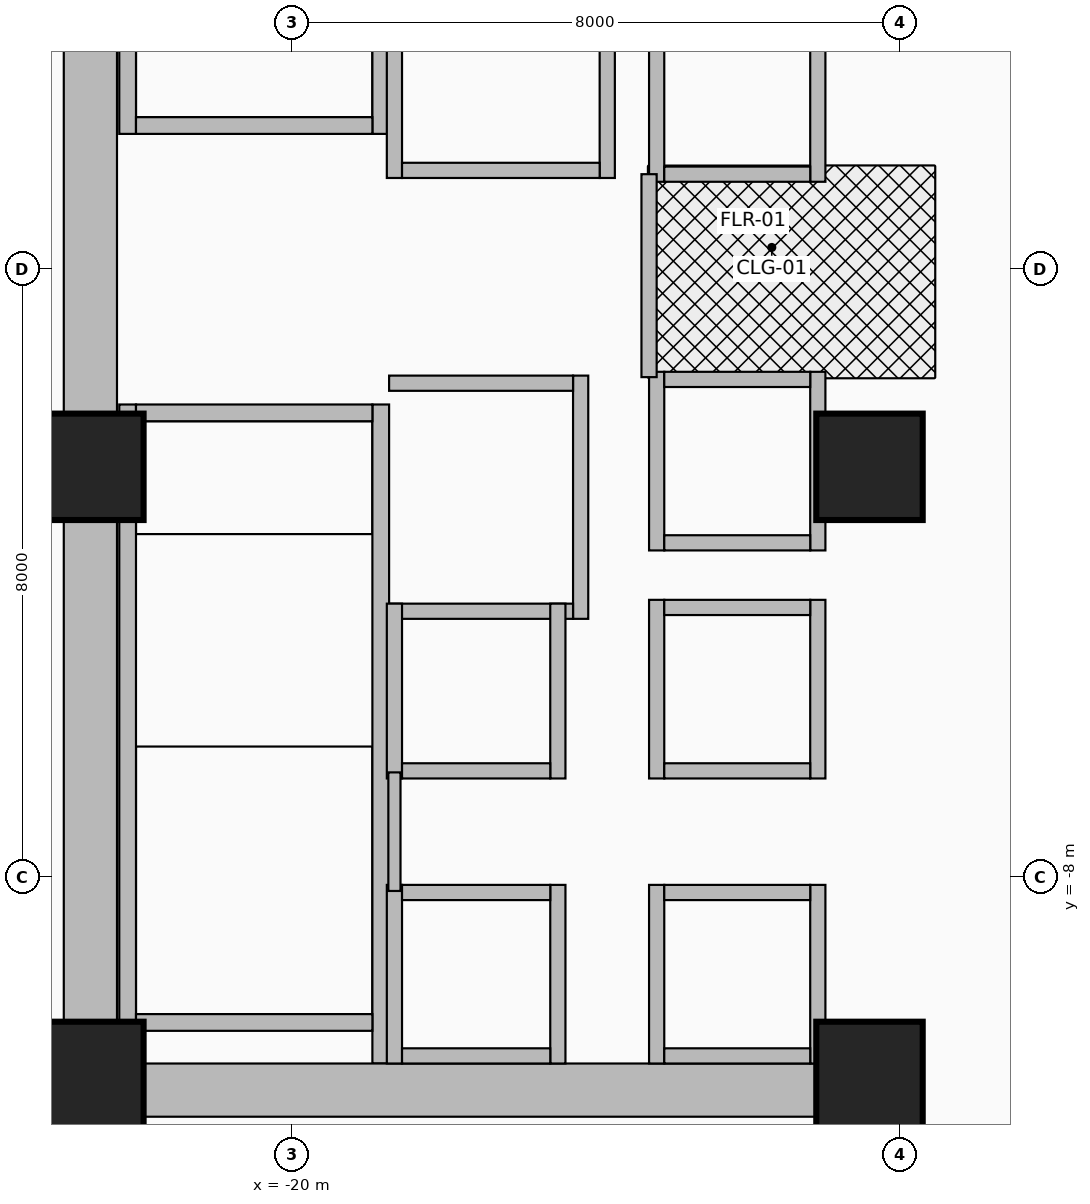
"""IFC4 building model, lengths in metres.
Left out: names, types, materials, properties, quantities, classifications, styles, units other than length and angle.
Written with IfcOpenShell. Run it as: python <this file> out.ifc"""

import sys

from ifc_helpers import new_model, si_unit, direction, frame, frame_2d, origin, origin_2d, place, context, subcontext, project, spatial, rectangle, extrude, source, transform, mapped, element, fill, save


model = new_model("IFC4")
c1 = context("Model", 3, precision=1e-05, world=origin(), true_north=direction((0.0, 1.0)))
c2 = subcontext(c1, "Body", "Model", "MODEL_VIEW")
j1 = project(units=[si_unit("LENGTHUNIT", "METRE"), si_unit("PLANEANGLEUNIT", "RADIAN")], contexts=[c1])
p1 = place(None, origin())
s1 = spatial("IfcSite", under=j1, at=p1, CompositionType="ELEMENT")
p2 = place(p1, origin())
s2 = spatial("IfcBuilding", under=s1, at=p2, CompositionType="ELEMENT")
p3 = place(p2, frame((0.0, 0.0, 48.2)))
s3 = spatial("IfcBuildingStorey", under=s2, at=p3, CompositionType="ELEMENT", Elevation=48.2)
for number, where, z_axis, x_axis in (
    (1, (-22.16, 1.78, 0.0), (0.0, 0.0, 1.0), (0.0, 1.0, 0.0)),
    (2, (-18.83, 1.78, 0.0), (0.0, 0.0, 1.0), (0.0, 1.0, 0.0)),
):
    element("IfcWall", number, at=place(p3, frame(where, z_axis=z_axis, x_axis=x_axis)), inside=s3, PredefinedType="SHEAR", context=c2, shape_type="SweptSolid", body=[
        extrude(rectangle(XDim=8.67, YDim=0.22, at=frame_2d((4.335, 0.0))), origin(), (0.0, 0.0, 1.0), 3.46),
    ])
p4 = place(p3, frame((-22.05, 1.89, 0.0), z_axis=(0.0, 0.0, 1.0), x_axis=(1.0, 0.0, 0.0)))
e3 = element("IfcWall", 3, at=p4, inside=s3, PredefinedType="SHEAR", context=c2, shape_type="SweptSolid", body=[
    extrude(rectangle(XDim=3.11, YDim=0.22, at=frame_2d((1.555, 0.0))), origin(), (0.0, 0.0, 1.0), 3.46),
])
p5 = place(p4, frame((1.0, 0.0, 0.0)))
e4 = element("IfcOpeningElement", 4, at=p5, cuts=e3, PredefinedType="OPENING", context=c2, shape_type="SweptSolid", body=[
    extrude(rectangle(XDim=1.1, YDim=2.15, at=frame_2d((0.55, 1.075))), frame((0.0, 0.125, 0.0), z_axis=(0.0, -1.0, 0.0), x_axis=(1.0, 0.0, 0.0)), (0.0, 0.0, 1.0), 0.25),
])
for number, where, z_axis, x_axis in (
    (5, (-22.16, -10.45, 0.0), (0.0, 0.0, 1.0), (0.0, 1.0, 0.0)),
    (6, (-18.83, -10.45, 0.0), (0.0, 0.0, 1.0), (0.0, 1.0, 0.0)),
):
    element("IfcWall", number, at=place(p3, frame(where, z_axis=z_axis, x_axis=x_axis)), inside=s3, PredefinedType="SHEAR", context=c2, shape_type="SweptSolid", body=[
        extrude(rectangle(XDim=8.67, YDim=0.22, at=frame_2d((4.335, 0.0))), origin(), (0.0, 0.0, 1.0), 3.46),
    ])
p6 = place(p3, frame((-22.05, -9.91, 0.0), z_axis=(0.0, 0.0, 1.0), x_axis=(1.0, 0.0, 0.0)))
e7 = element("IfcWall", 7, at=p6, inside=s3, PredefinedType="SHEAR", context=c2, shape_type="SweptSolid", body=[
    extrude(rectangle(XDim=3.11, YDim=0.22, at=frame_2d((1.555, 0.0))), origin(), (0.0, 0.0, 1.0), 3.46),
])
p7 = place(p3, frame((-22.05, -1.89, 0.0), z_axis=(0.0, 0.0, 1.0), x_axis=(1.0, 0.0, 0.0)))
e8 = element("IfcWall", 8, at=p7, inside=s3, PredefinedType="SHEAR", context=c2, shape_type="SweptSolid", body=[
    extrude(rectangle(XDim=3.11, YDim=0.22, at=frame_2d((1.555, 0.0))), origin(), (0.0, 0.0, 1.0), 3.46),
])
p8 = place(p7, frame((1.0, 0.0, 0.0)))
e9 = element("IfcOpeningElement", 9, at=p8, cuts=e8, PredefinedType="OPENING", context=c2, shape_type="SweptSolid", body=[
    extrude(rectangle(XDim=1.1, YDim=2.15, at=frame_2d((0.55, 1.075))), frame((0.0, 0.125, 0.0), z_axis=(0.0, -1.0, 0.0), x_axis=(1.0, 0.0, 0.0)), (0.0, 0.0, 1.0), 0.25),
])
p9 = place(p3, frame((-22.65, -11.15, 0.0), z_axis=(0.0, 0.0, 1.0), x_axis=(0.0, 1.0, 0.0)))
e10 = element("IfcWall", 10, at=p9, inside=s3, PredefinedType="SHEAR", context=c2, shape_type="SweptSolid", body=[
    extrude(rectangle(XDim=22.3, YDim=0.7, at=frame_2d((11.15, 0.0))), origin(), (0.0, 0.0, 1.0), 3.46),
])
p10 = place(p3, frame((-22.65, -10.8, 0.0), z_axis=(0.0, 0.0, 1.0), x_axis=(1.0, 0.0, 0.0)))
e11 = element("IfcWall", 11, at=p10, inside=s3, PredefinedType="SHEAR", context=c2, shape_type="SweptSolid", body=[
    extrude(rectangle(XDim=10.25, YDim=0.7, at=frame_2d((5.125, 0.0))), origin(), (0.0, 0.0, 1.0), 3.46),
])
m1 = source(origin(), c2, "Body", "SweptSolid", [
    extrude(rectangle(XDim=1.4, YDim=1.4, at=origin_2d()), origin(), (0.0, 0.0, 1.0), 3.7),
])
for number, where, z_axis, x_axis in (
    (12, (-22.65, -10.6, 0.0), (0.0, 0.0, 1.0), (1.0, 0.0, 0.0)),
    (13, (-12.4, -10.6, 0.0), (0.0, 0.0, 1.0), (1.0, 0.0, 0.0)),
    (14, (-22.65, -2.6, 0.0), (0.0, 0.0, 1.0), (1.0, 0.0, 0.0)),
    (15, (-12.4, -2.6, 0.0), (0.0, 0.0, 1.0), (1.0, 0.0, 0.0)),
):
    element("IfcColumn", number, at=place(p3, frame(where, z_axis=z_axis, x_axis=x_axis)), inside=s3, PredefinedType="COLUMN", context=c2, shape_type="MappedRepresentation", body=[
        mapped(m1, transform((0.0, 0.0, 0.0), x_axis=(1.0, 0.0, 0.0), y_axis=(0.0, 1.0, 0.0), z_axis=(0.0, 0.0, 1.0), scale=1.0)),
    ])
for number, where, z_axis, x_axis in (
    (16, (-18.65, 1.2, 0.0), (0.0, 0.0, 1.0), (0.0, 1.0, 0.0)),
    (17, (-15.85, 1.2, 0.0), (0.0, 0.0, 1.0), (0.0, 1.0, 0.0)),
):
    element("IfcWall", number, at=place(p3, frame(where, z_axis=z_axis, x_axis=x_axis)), inside=s3, PredefinedType="MOVABLE", context=c2, shape_type="SweptSolid", body=[
        extrude(rectangle(XDim=3.225, YDim=0.2, at=frame_2d((1.613, 0.0))), origin(), (0.0, 0.0, 1.0), 3.46),
    ])
p11 = place(p3, frame((-18.55, 1.3, 0.0), z_axis=(0.0, 0.0, 1.0), x_axis=(1.0, 0.0, 0.0)))
e18 = element("IfcWall", 18, at=p11, inside=s3, PredefinedType="MOVABLE", context=c2, shape_type="SweptSolid", body=[
    extrude(rectangle(XDim=2.6, YDim=0.2, at=frame_2d((1.3, 0.0))), origin(), (0.0, 0.0, 1.0), 3.46),
])
p12 = place(p11, frame((0.7, 0.0, 0.0)))
e19 = element("IfcOpeningElement", 19, at=p12, cuts=e18, PredefinedType="OPENING", context=c2, shape_type="SweptSolid", body=[
    extrude(rectangle(XDim=1.2, YDim=2.1, at=frame_2d((0.6, 1.05))), frame((0.0, 0.115, 0.0), z_axis=(0.0, -1.0, 0.0), x_axis=(1.0, 0.0, 0.0)), (0.0, 0.0, 1.0), 0.23),
])
p13 = place(p3, frame((-16.2, -4.6, 0.0), z_axis=(0.0, 0.0, 1.0), x_axis=(0.0, 1.0, 0.0)))
e20 = element("IfcWall", 20, at=p13, inside=s3, PredefinedType="MOVABLE", context=c2, shape_type="SweptSolid", body=[
    extrude(rectangle(XDim=3.2, YDim=0.2, at=frame_2d((1.6, 0.0))), origin(), (0.0, 0.0, 1.0), 3.46),
])
p14 = place(p3, frame((-18.72, -4.5, 0.0), z_axis=(0.0, 0.0, 1.0), x_axis=(1.0, 0.0, 0.0)))
e21 = element("IfcWall", 21, at=p14, inside=s3, PredefinedType="MOVABLE", context=c2, shape_type="SweptSolid", body=[
    extrude(rectangle(XDim=2.42, YDim=0.2, at=frame_2d((1.21, 0.0))), origin(), (0.0, 0.0, 1.0), 3.46),
])
p15 = place(p3, frame((-18.72, -1.5, 0.0), z_axis=(0.0, 0.0, 1.0), x_axis=(1.0, 0.0, 0.0)))
e22 = element("IfcWall", 22, at=p15, inside=s3, PredefinedType="MOVABLE", context=c2, shape_type="SweptSolid", body=[
    extrude(rectangle(XDim=2.42, YDim=0.2, at=frame_2d((1.21, 0.0))), origin(), (0.0, 0.0, 1.0), 3.46),
])
p16 = place(p15, frame((0.61, 0.0, 0.0)))
e23 = element("IfcOpeningElement", 23, at=p16, cuts=e22, PredefinedType="OPENING", context=c2, shape_type="SweptSolid", body=[
    extrude(rectangle(XDim=1.2, YDim=2.1, at=frame_2d((0.6, 1.05))), frame((0.0, 0.115, 0.0), z_axis=(0.0, -1.0, 0.0), x_axis=(1.0, 0.0, 0.0)), (0.0, 0.0, 1.0), 0.23),
])
for number, where, z_axis, x_axis in (
    (24, (-15.2, -10.45, 0.0), (0.0, 0.0, 1.0), (0.0, 1.0, 0.0)),
    (25, (-13.08, -10.45, 0.0), (0.0, 0.0, 1.0), (0.0, 1.0, 0.0)),
):
    element("IfcWall", number, at=place(p3, frame(where, z_axis=z_axis, x_axis=x_axis)), inside=s3, PredefinedType="MOVABLE", context=c2, shape_type="SweptSolid", body=[
        extrude(rectangle(XDim=2.35, YDim=0.2, at=frame_2d((1.175, 0.0))), origin(), (0.0, 0.0, 1.0), 2.583),
    ])
p17 = place(p3, frame((-15.1, -10.35, 0.0), z_axis=(0.0, 0.0, 1.0), x_axis=(1.0, 0.0, 0.0)))
e26 = element("IfcWall", 26, at=p17, inside=s3, PredefinedType="MOVABLE", context=c2, shape_type="SweptSolid", body=[
    extrude(rectangle(XDim=1.92, YDim=0.2, at=frame_2d((0.96, 0.0))), origin(), (0.0, 0.0, 1.0), 2.583),
])
p18 = place(p3, frame((-15.1, -8.2, 0.0), z_axis=(0.0, 0.0, 1.0), x_axis=(1.0, 0.0, 0.0)))
e27 = element("IfcWall", 27, at=p18, inside=s3, PredefinedType="MOVABLE", context=c2, shape_type="SweptSolid", body=[
    extrude(rectangle(XDim=1.92, YDim=0.2, at=frame_2d((0.96, 0.0))), origin(), (0.0, 0.0, 1.0), 3.46),
])
p19 = place(p18, frame((0.41, 0.0, 0.0)))
e28 = element("IfcOpeningElement", 28, at=p19, cuts=e27, PredefinedType="OPENING", context=c2, shape_type="SweptSolid", body=[
    extrude(rectangle(XDim=1.1, YDim=2.1, at=frame_2d((0.55, 1.05))), frame((0.0, 0.115, 0.0), z_axis=(0.0, -1.0, 0.0), x_axis=(1.0, 0.0, 0.0)), (0.0, 0.0, 1.0), 0.23),
])
for number, where, z_axis, x_axis in (
    (29, (-15.2, -6.7, 0.0), (0.0, 0.0, 1.0), (0.0, 1.0, 0.0)),
    (30, (-13.08, -6.7, 0.0), (0.0, 0.0, 1.0), (0.0, 1.0, 0.0)),
):
    element("IfcWall", number, at=place(p3, frame(where, z_axis=z_axis, x_axis=x_axis)), inside=s3, PredefinedType="MOVABLE", context=c2, shape_type="SweptSolid", body=[
        extrude(rectangle(XDim=2.35, YDim=0.2, at=frame_2d((1.175, 0.0))), origin(), (0.0, 0.0, 1.0), 3.46),
    ])
p20 = place(p3, frame((-15.1, -6.6, 0.0), z_axis=(0.0, 0.0, 1.0), x_axis=(1.0, 0.0, 0.0)))
e31 = element("IfcWall", 31, at=p20, inside=s3, PredefinedType="MOVABLE", context=c2, shape_type="SweptSolid", body=[
    extrude(rectangle(XDim=1.92, YDim=0.2, at=frame_2d((0.96, 0.0))), origin(), (0.0, 0.0, 1.0), 3.46),
])
p21 = place(p20, frame((0.41, 0.0, 0.0)))
e32 = element("IfcOpeningElement", 32, at=p21, cuts=e31, PredefinedType="OPENING", context=c2, shape_type="SweptSolid", body=[
    extrude(rectangle(XDim=1.1, YDim=2.1, at=frame_2d((0.55, 1.05))), frame((0.0, 0.115, 0.0), z_axis=(0.0, -1.0, 0.0), x_axis=(1.0, 0.0, 0.0)), (0.0, 0.0, 1.0), 0.23),
])
p22 = place(p3, frame((-15.1, -4.45, 0.0), z_axis=(0.0, 0.0, 1.0), x_axis=(1.0, 0.0, 0.0)))
e33 = element("IfcWall", 33, at=p22, inside=s3, PredefinedType="MOVABLE", context=c2, shape_type="SweptSolid", body=[
    extrude(rectangle(XDim=1.92, YDim=0.2, at=frame_2d((0.96, 0.0))), origin(), (0.0, 0.0, 1.0), 3.46),
])
for number, where, z_axis, x_axis in (
    (34, (-18.65, -10.45, 0.0), (0.0, 0.0, 1.0), (0.0, 1.0, 0.0)),
    (35, (-16.5, -10.45, 0.0), (0.0, 0.0, 1.0), (0.0, 1.0, 0.0)),
):
    element("IfcWall", number, at=place(p3, frame(where, z_axis=z_axis, x_axis=x_axis)), inside=s3, PredefinedType="MOVABLE", context=c2, shape_type="SweptSolid", body=[
        extrude(rectangle(XDim=2.35, YDim=0.2, at=frame_2d((1.175, 0.0))), origin(), (0.0, 0.0, 1.0), 2.583),
    ])
p23 = place(p3, frame((-18.55, -10.35, 0.0), z_axis=(0.0, 0.0, 1.0), x_axis=(1.0, 0.0, 0.0)))
e36 = element("IfcWall", 36, at=p23, inside=s3, PredefinedType="MOVABLE", context=c2, shape_type="SweptSolid", body=[
    extrude(rectangle(XDim=1.95, YDim=0.2, at=frame_2d((0.975, 0.0))), origin(), (0.0, 0.0, 1.0), 2.583),
])
p24 = place(p3, frame((-18.55, -8.2, 0.0), z_axis=(0.0, 0.0, 1.0), x_axis=(1.0, 0.0, 0.0)))
e37 = element("IfcWall", 37, at=p24, inside=s3, PredefinedType="MOVABLE", context=c2, shape_type="SweptSolid", body=[
    extrude(rectangle(XDim=1.95, YDim=0.2, at=frame_2d((0.975, 0.0))), origin(), (0.0, 0.0, 1.0), 3.46),
])
for number, where, z_axis, x_axis in (
    (38, (-15.2, 1.15, 0.0), (0.0, 0.0, 1.0), (0.0, 1.0, 0.0)),
    (39, (-13.08, 1.15, 0.0), (0.0, 0.0, 1.0), (0.0, 1.0, 0.0)),
):
    element("IfcWall", number, at=place(p3, frame(where, z_axis=z_axis, x_axis=x_axis)), inside=s3, PredefinedType="MOVABLE", context=c2, shape_type="SweptSolid", body=[
        extrude(rectangle(XDim=2.25, YDim=0.2, at=frame_2d((1.125, 0.0))), origin(), (0.0, 0.0, 1.0), 3.46),
    ])
p25 = place(p3, frame((-15.1, 1.25, 0.0), z_axis=(0.0, 0.0, 1.0), x_axis=(1.0, 0.0, 0.0)))
e40 = element("IfcWall", 40, at=p25, inside=s3, PredefinedType="MOVABLE", context=c2, shape_type="SweptSolid", body=[
    extrude(rectangle(XDim=1.92, YDim=0.2, at=frame_2d((0.96, 0.0))), origin(), (0.0, 0.0, 1.0), 3.46),
])
for number, where, z_axis, x_axis in (
    (41, (-18.65, -6.7, 0.0), (0.0, 0.0, 1.0), (0.0, 1.0, 0.0)),
    (42, (-16.5, -6.7, 0.0), (0.0, 0.0, 1.0), (0.0, 1.0, 0.0)),
):
    element("IfcWall", number, at=place(p3, frame(where, z_axis=z_axis, x_axis=x_axis)), inside=s3, PredefinedType="MOVABLE", context=c2, shape_type="SweptSolid", body=[
        extrude(rectangle(XDim=2.3, YDim=0.2, at=frame_2d((1.15, 0.0))), origin(), (0.0, 0.0, 1.0), 3.46),
    ])
p26 = place(p3, frame((-18.55, -6.6, 0.0), z_axis=(0.0, 0.0, 1.0), x_axis=(1.0, 0.0, 0.0)))
e43 = element("IfcWall", 43, at=p26, inside=s3, PredefinedType="MOVABLE", context=c2, shape_type="SweptSolid", body=[
    extrude(rectangle(XDim=1.95, YDim=0.2, at=frame_2d((0.975, 0.0))), origin(), (0.0, 0.0, 1.0), 3.46),
])
for number, where, z_axis, x_axis in (
    (44, (-15.2, -3.7, 0.0), (0.0, 0.0, 1.0), (0.0, 1.0, 0.0)),
    (45, (-13.08, -3.7, 0.0), (0.0, 0.0, 1.0), (0.0, 1.0, 0.0)),
):
    element("IfcWall", number, at=place(p3, frame(where, z_axis=z_axis, x_axis=x_axis)), inside=s3, PredefinedType="MOVABLE", context=c2, shape_type="SweptSolid", body=[
        extrude(rectangle(XDim=2.35, YDim=0.2, at=frame_2d((1.175, 0.0))), origin(), (0.0, 0.0, 1.0), 3.46),
    ])
for number, where, z_axis, x_axis in (
    (46, (-15.1, -3.6, 0.0), (0.0, 0.0, 1.0), (1.0, 0.0, 0.0)),
    (47, (-15.1, -1.45, 0.0), (0.0, 0.0, 1.0), (1.0, 0.0, 0.0)),
):
    element("IfcWall", number, at=place(p3, frame(where, z_axis=z_axis, x_axis=x_axis)), inside=s3, PredefinedType="MOVABLE", context=c2, shape_type="SweptSolid", body=[
        extrude(rectangle(XDim=1.92, YDim=0.2, at=frame_2d((0.96, 0.0))), origin(), (0.0, 0.0, 1.0), 3.46),
    ])
p27 = place(p3, frame((-15.3, -1.42, 0.0), z_axis=(0.0, 0.0, 1.0), x_axis=(0.0, 1.0, 0.0)))
e48 = element("IfcWall", 48, at=p27, inside=s3, PredefinedType="PARTITIONING", context=c2, shape_type="SweptSolid", body=[
    extrude(rectangle(XDim=2.67, YDim=0.2, at=frame_2d((1.335, 0.0))), origin(), (0.0, 0.0, 1.0), 3.46),
])
p28 = place(p27, frame((0.78, 0.0, 0.0)))
e49 = element("IfcOpeningElement", 49, at=p28, cuts=e48, PredefinedType="OPENING", context=c2, shape_type="SweptSolid", body=[
    extrude(rectangle(XDim=1.05, YDim=2.15, at=frame_2d((0.525, 1.075))), frame((0.0, 0.115, 0.0), z_axis=(0.0, -1.0, 0.0), x_axis=(1.0, 0.0, 0.0)), (0.0, 0.0, 1.0), 0.23),
])
p29 = place(p3, frame((-18.65, -8.18, 0.0), z_axis=(0.0, 0.0, 1.0), x_axis=(0.0, 1.0, 0.0)))
e50 = element("IfcWall", 50, at=p29, inside=s3, PredefinedType="PARTITIONING", context=c2, shape_type="SweptSolid", body=[
    extrude(rectangle(XDim=1.56, YDim=0.16, at=frame_2d((0.78, 0.0))), origin(), (0.0, 0.0, 1.0), 3.46),
])
p30 = place(p12, origin())
e51 = element("IfcDoor", 51, at=p30, inside=s3, OperationType="DOUBLE_DOOR_SLIDING", PredefinedType="DOOR", context=c2, shape_type="SweptSolid", body=[
    extrude(rectangle(XDim=1.2, YDim=2.1, at=frame_2d((0.6, 1.05))), frame((0.0, 0.025, 0.0), z_axis=(0.0, -1.0, 0.0), x_axis=(1.0, 0.0, 0.0)), (0.0, 0.0, 1.0), 0.05),
])
fill(e19, e51)
p31 = place(p16, origin())
e52 = element("IfcDoor", 52, at=p31, inside=s3, OperationType="DOUBLE_DOOR_SLIDING", PredefinedType="DOOR", context=c2, shape_type="SweptSolid", body=[
    extrude(rectangle(XDim=1.2, YDim=2.1, at=frame_2d((0.6, 1.05))), frame((0.0, 0.025, 0.0), z_axis=(0.0, -1.0, 0.0), x_axis=(1.0, 0.0, 0.0)), (0.0, 0.0, 1.0), 0.05),
])
fill(e23, e52)
p32 = place(p19, origin())
e53 = element("IfcDoor", 53, at=p32, inside=s3, OperationType="DOUBLE_DOOR_SLIDING", PredefinedType="DOOR", context=c2, shape_type="SweptSolid", body=[
    extrude(rectangle(XDim=1.1, YDim=2.1, at=frame_2d((0.55, 1.05))), frame((0.0, 0.025, 0.0), z_axis=(0.0, -1.0, 0.0), x_axis=(1.0, 0.0, 0.0)), (0.0, 0.0, 1.0), 0.05),
])
fill(e28, e53)
p33 = place(p21, origin())
e54 = element("IfcDoor", 54, at=p33, inside=s3, OperationType="DOUBLE_DOOR_SLIDING", PredefinedType="DOOR", context=c2, shape_type="SweptSolid", body=[
    extrude(rectangle(XDim=1.1, YDim=2.1, at=frame_2d((0.55, 1.05))), frame((0.0, 0.025, 0.0), z_axis=(0.0, -1.0, 0.0), x_axis=(1.0, 0.0, 0.0)), (0.0, 0.0, 1.0), 0.05),
])
fill(e32, e54)
p34 = place(p28, origin())
e55 = element("IfcDoor", 55, at=p34, inside=s3, OperationType="SINGLE_SWING_RIGHT", PredefinedType="DOOR", context=c2, shape_type="SweptSolid", body=[
    extrude(rectangle(XDim=1.05, YDim=2.15, at=frame_2d((0.525, 1.075))), frame((0.0, 0.025, 0.0), z_axis=(0.0, -1.0, 0.0), x_axis=(1.0, 0.0, 0.0)), (0.0, 0.0, 1.0), 0.05),
])
fill(e49, e55)
p35 = place(p5, frame((1.1, 0.0, 0.0), z_axis=(0.0, 0.0, 1.0), x_axis=(-1.0, 0.0, 0.0)))
e56 = element("IfcDoor", 56, at=p35, inside=s3, OperationType="SINGLE_SWING_LEFT", PredefinedType="DOOR", context=c2, shape_type="SweptSolid", body=[
    extrude(rectangle(XDim=1.1, YDim=2.15, at=frame_2d((0.55, 1.075))), frame((0.0, 0.025, 0.0), z_axis=(0.0, -1.0, 0.0), x_axis=(1.0, 0.0, 0.0)), (0.0, 0.0, 1.0), 0.05),
])
fill(e4, e56)
p36 = place(p8, origin())
e57 = element("IfcDoor", 57, at=p36, inside=s3, OperationType="SINGLE_SWING_RIGHT", PredefinedType="DOOR", context=c2, shape_type="SweptSolid", body=[
    extrude(rectangle(XDim=1.1, YDim=2.15, at=frame_2d((0.55, 1.075))), frame((0.0, 0.025, 0.0), z_axis=(0.0, -1.0, 0.0), x_axis=(1.0, 0.0, 0.0)), (0.0, 0.0, 1.0), 0.05),
])
fill(e9, e57)
save(model, sys.argv[1])
